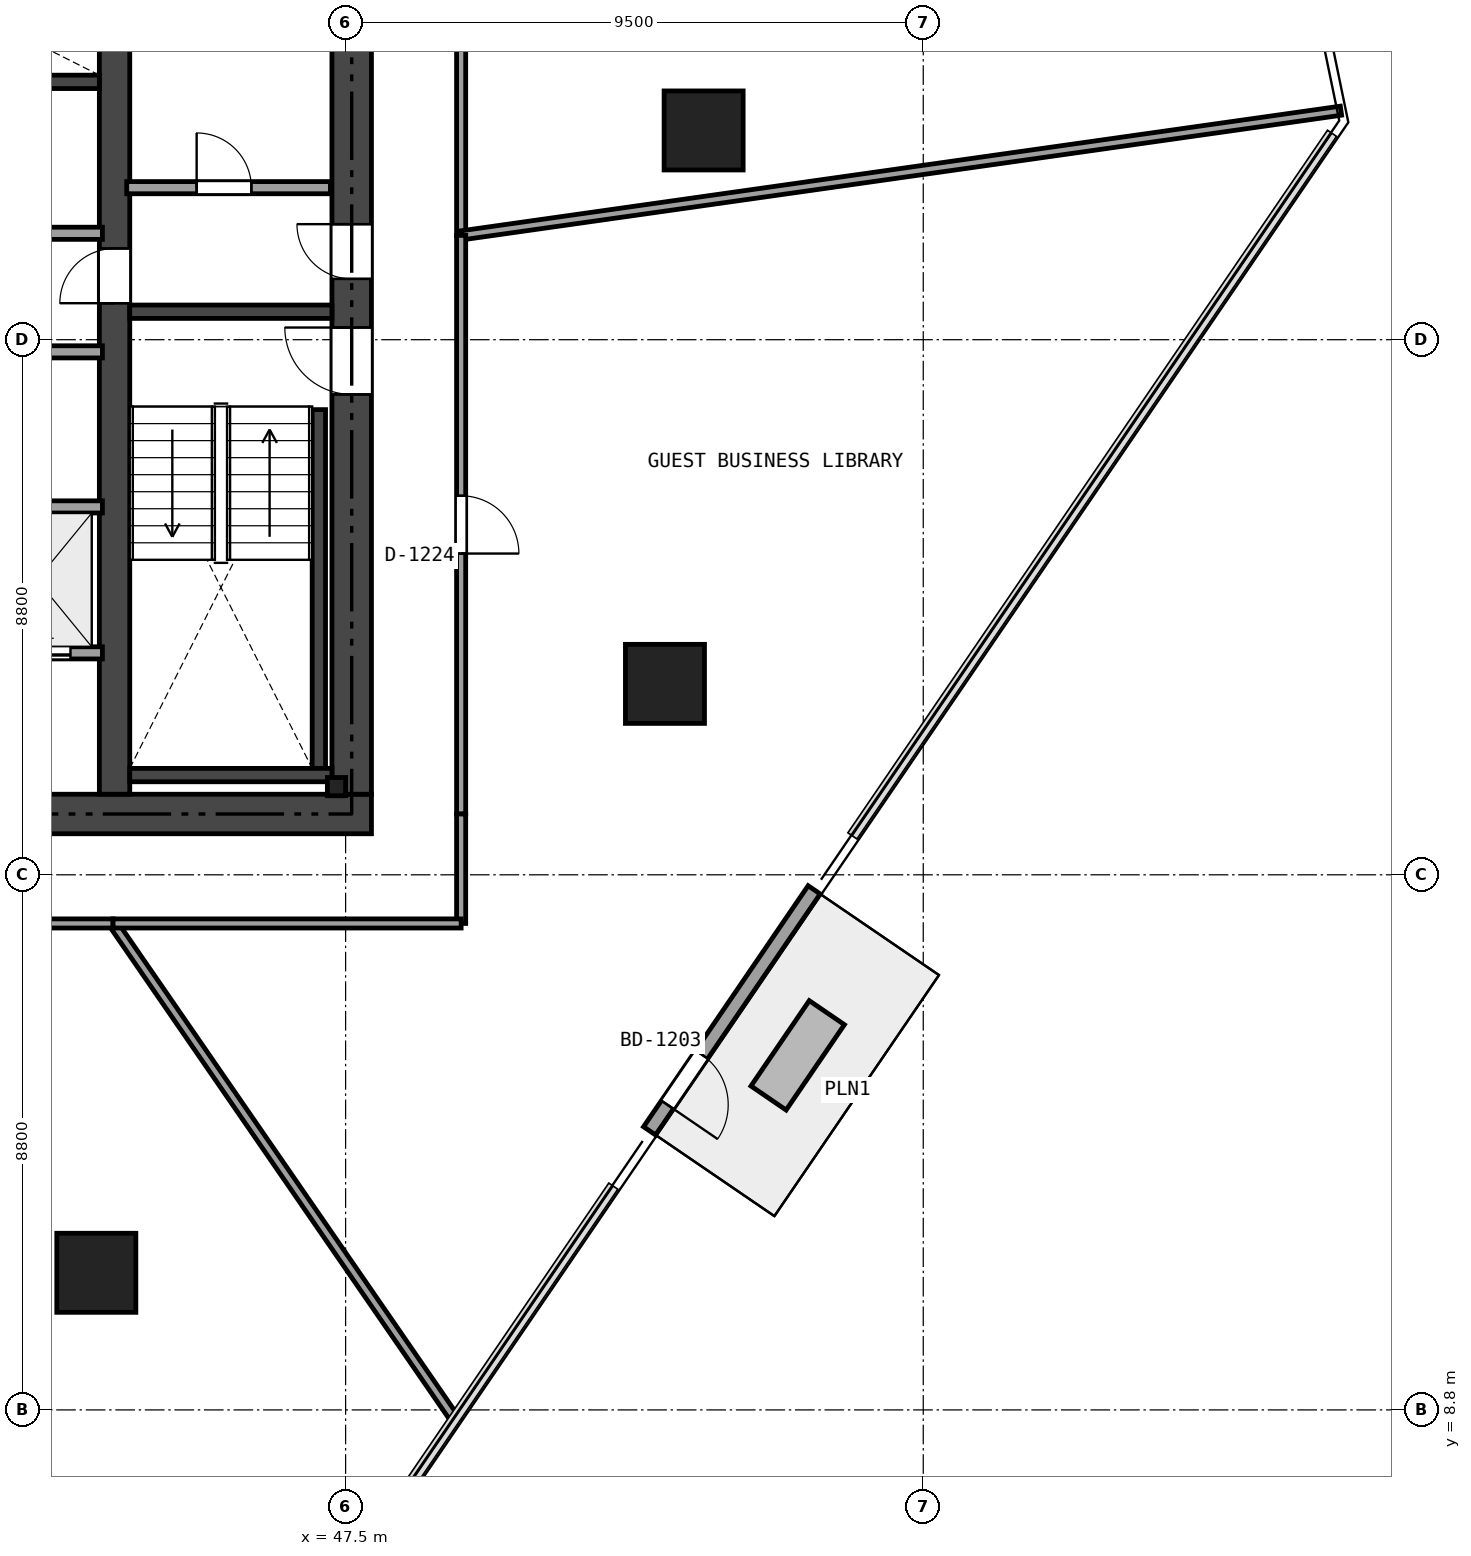
"""IFC4 building model, lengths in metres.
Left out: names, types, materials, properties, quantities, classifications, styles, units other than length and angle.
Written with IfcOpenShell. Run it as: python <this file> out.ifc"""

import sys

from ifc_helpers import new_model, si_unit, direction, frame, frame_2d, origin, origin_2d, place, context, subcontext, project, spatial, rectangle, i_section, extrude, element, fill, save


model = new_model("IFC4")
c1 = context("Model", 3, precision=1e-05, world=origin(), true_north=direction((0.0, 1.0)))
c2 = subcontext(c1, "Body", "Model", "MODEL_VIEW")
j1 = project(units=[si_unit("LENGTHUNIT", "METRE"), si_unit("PLANEANGLEUNIT", "RADIAN")], contexts=[c1])
p1 = place(None, origin())
s1 = spatial("IfcSite", under=j1, at=p1, CompositionType="ELEMENT")
p2 = place(p1, origin())
s2 = spatial("IfcBuilding", under=s1, at=p2, CompositionType="ELEMENT")
p3 = place(p2, frame((0.0, 0.0, 51.15)))
s3 = spatial("IfcBuildingStorey", under=s2, at=p3, CompositionType="ELEMENT", Elevation=51.15)
p4 = place(p3, frame((26.475, 18.6, 0.0), z_axis=(0.0, 0.0, 1.0), x_axis=(1.0, 0.0, 0.0)))
e1 = element("IfcWall", 1, at=p4, inside=s3, PredefinedType="SHEAR", context=c2, shape_type="SweptSolid", body=[
    extrude(rectangle(XDim=21.45, YDim=0.65, at=frame_2d((10.725, 0.0))), origin(), (0.0, 0.0, 1.0), 3.17),
])
p5 = place(p4, frame((12.45, 0.0, 0.0)))
e2 = element("IfcOpeningElement", 2, at=p5, cuts=e1, PredefinedType="OPENING", context=c2, shape_type="SweptSolid", body=[
    extrude(rectangle(XDim=1.15, YDim=2.15, at=frame_2d((0.575, 1.075))), frame((0.0, 0.335, 0.0), z_axis=(0.0, -1.0, 0.0), x_axis=(1.0, 0.0, 0.0)), (0.0, 0.0, 1.0), 0.67),
])
p6 = place(p4, frame((5.275, 0.0, 0.0)))
e3 = element("IfcOpeningElement", 3, at=p6, cuts=e1, PredefinedType="OPENING", context=c2, shape_type="SweptSolid", body=[
    extrude(rectangle(XDim=0.9, YDim=2.1, at=frame_2d((0.45, 1.05))), frame((0.0, 0.335, 0.0), z_axis=(0.0, -1.0, 0.0), x_axis=(1.0, 0.0, 0.0)), (0.0, 0.0, 1.0), 0.67),
])
p7 = place(p3, frame((47.6, 18.925, 0.0), z_axis=(0.0, 0.0, 1.0), x_axis=(0.0, 1.0, 0.0)))
e4 = element("IfcWall", 4, at=p7, inside=s3, PredefinedType="SHEAR", context=c2, shape_type="SweptSolid", body=[
    extrude(rectangle(XDim=14.95, YDim=0.65, at=frame_2d((7.475, 0.0))), origin(), (0.0, 0.0, 1.0), 3.17),
])
p8 = place(p7, frame((6.575, 0.0, 0.0)))
e5 = element("IfcOpeningElement", 5, at=p8, cuts=e4, PredefinedType="OPENING", context=c2, shape_type="SweptSolid", body=[
    extrude(rectangle(XDim=1.1, YDim=2.15, at=frame_2d((0.55, 1.075))), frame((0.0, 0.335, 0.0), z_axis=(0.0, -1.0, 0.0), x_axis=(1.0, 0.0, 0.0)), (0.0, 0.0, 1.0), 0.67),
])
p9 = place(p7, frame((8.475, 0.0, 0.0)))
e6 = element("IfcOpeningElement", 6, at=p9, cuts=e4, PredefinedType="OPENING", context=c2, shape_type="SweptSolid", body=[
    extrude(rectangle(XDim=0.9, YDim=2.1, at=frame_2d((0.45, 1.05))), frame((0.0, 0.335, 0.0), z_axis=(0.0, -1.0, 0.0), x_axis=(1.0, 0.0, 0.0)), (0.0, 0.0, 1.0), 0.67),
])
p10 = place(p7, frame((13.125, 0.0, 0.0)))
e7 = element("IfcOpeningElement", 7, at=p10, cuts=e4, PredefinedType="OPENING", context=c2, shape_type="SweptSolid", body=[
    extrude(rectangle(XDim=0.9, YDim=2.1, at=frame_2d((0.45, 1.05))), frame((0.0, 0.335, 0.0), z_axis=(0.0, -1.0, 0.0), x_axis=(1.0, 0.0, 0.0)), (0.0, 0.0, 1.0), 0.67),
])
p11 = place(p3, frame((43.7, 18.925, 0.0), z_axis=(0.0, 0.0, 1.0), x_axis=(0.0, 1.0, 0.0)))
e8 = element("IfcWall", 8, at=p11, inside=s3, PredefinedType="SHEAR", context=c2, shape_type="SweptSolid", body=[
    extrude(rectangle(XDim=14.95, YDim=0.5, at=frame_2d((7.475, 0.0))), origin(), (0.0, 0.0, 1.0), 3.17),
])
p12 = place(p11, frame((8.075, 0.0, 0.0)))
e9 = element("IfcOpeningElement", 9, at=p12, cuts=e8, PredefinedType="OPENING", context=c2, shape_type="SweptSolid", body=[
    extrude(rectangle(XDim=0.9, YDim=2.1, at=frame_2d((0.45, 1.05))), frame((0.0, 0.26, 0.0), z_axis=(0.0, -1.0, 0.0), x_axis=(1.0, 0.0, 0.0)), (0.0, 0.0, 1.0), 0.52),
])
p13 = place(p3, frame((43.95, 26.86, 0.0), z_axis=(0.0, 0.0, 1.0), x_axis=(1.0, 0.0, 0.0)))
e10 = element("IfcWall", 10, at=p13, inside=s3, PredefinedType="SHEAR", context=c2, shape_type="SweptSolid", body=[
    extrude(rectangle(XDim=3.325, YDim=0.22, at=frame_2d((1.663, 0.0))), origin(), (0.0, 0.0, 1.0), 3.17),
])
p14 = place(p3, frame((47.06, 19.35, 0.0), z_axis=(0.0, 0.0, 1.0), x_axis=(0.0, 1.0, 0.0)))
e11 = element("IfcWall", 11, at=p14, inside=s3, PredefinedType="SHEAR", context=c2, shape_type="SweptSolid", body=[
    extrude(rectangle(XDim=5.9, YDim=0.22, at=frame_2d((2.95, 0.0))), origin(), (0.0, 0.0, 1.0), 3.17),
])
p15 = place(p3, frame((43.95, 19.24, 0.0), z_axis=(0.0, 0.0, 1.0), x_axis=(1.0, 0.0, 0.0)))
e12 = element("IfcWall", 12, at=p15, inside=s3, PredefinedType="SHEAR", context=c2, shape_type="SweptSolid", body=[
    extrude(rectangle(XDim=3.325, YDim=0.22, at=frame_2d((1.663, 0.0))), origin(), (0.0, 0.0, 1.0), 3.17),
])
p16 = place(p3, frame((35.84, 30.64, 0.0), z_axis=(0.0, 0.0, 1.0), x_axis=(1.0, 0.0, 0.0)))
e13 = element("IfcWall", 13, at=p16, inside=s3, PredefinedType="SHEAR", context=c2, shape_type="SweptSolid", body=[
    extrude(rectangle(XDim=7.61, YDim=0.22, at=frame_2d((3.805, 0.0))), origin(), (0.0, 0.0, 1.0), 3.17),
])
for number, where, z_axis, x_axis in (
    (14, (53.388, 29.841, 0.0), (0.0, 0.0, 1.0), (1.0, 0.0, 0.0)),
    (15, (43.4, 11.055, 0.0), (0.0, 0.0, 1.0), (1.0, 0.0, 0.0)),
    (16, (52.752, 20.74, 0.0), (0.0, 0.0, 1.0), (1.0, 0.0, 0.0)),
):
    element("IfcColumn", number, at=place(p3, frame(where, z_axis=z_axis, x_axis=x_axis)), inside=s3, PredefinedType="COLUMN", context=c2, shape_type="SweptSolid", body=[
        extrude(rectangle(XDim=1.3, YDim=1.3, at=origin_2d()), origin(), (0.0, 0.0, 1.0), 3.17),
    ])
p17 = place(p3, frame((47.35, 19.05, 0.0), z_axis=(0.0, 0.0, 1.0), x_axis=(1.0, 0.0, 0.0)))
e17 = element("IfcColumn", 17, at=p17, inside=s3, PredefinedType="PILASTER", context=c2, shape_type="SweptSolid", body=[
    extrude(i_section(OverallWidth=0.3, OverallDepth=0.3, WebThickness=0.011, FlangeThickness=0.019, at=origin_2d()), origin(), (0.0, 0.0, 1.0), 3.17),
])
p18 = place(p3, frame((55.206, 17.353, 0.0), z_axis=(0.0, 0.0, 1.0), x_axis=(-0.563937959306, -0.825817157761, 0.0)))
e18 = element("IfcWall", 18, at=p18, inside=s3, PredefinedType="SOLIDWALL", context=c2, shape_type="SweptSolid", body=[
    extrude(rectangle(XDim=4.8, YDim=0.24, at=frame_2d((2.4, 0.0))), origin(), (0.0, 0.0, 1.0), 3.17),
])
p19 = place(p18, frame((3.28, 0.0, 0.0)))
e19 = element("IfcOpeningElement", 19, at=p19, cuts=e18, PredefinedType="OPENING", context=c2, shape_type="SweptSolid", body=[
    extrude(rectangle(XDim=1.0, YDim=2.15, at=frame_2d((0.5, 1.075))), frame((0.0, 0.13, 0.0), z_axis=(0.0, -1.0, 0.0), x_axis=(1.0, 0.0, 0.0)), (0.0, 0.0, 1.0), 0.26),
])
p20 = place(p3, frame((43.9, 28.9, 0.0), z_axis=(0.0, 0.0, 1.0), x_axis=(1.0, 0.0, 0.0)))
e20 = element("IfcWall", 20, at=p20, inside=s3, PredefinedType="SOLIDWALL", context=c2, shape_type="SweptSolid", body=[
    extrude(rectangle(XDim=3.35, YDim=0.2, at=frame_2d((1.675, 0.0))), origin(), (0.0, 0.0, 1.0), 3.17),
])
p21 = place(p20, frame((1.15, 0.0, 0.0)))
e21 = element("IfcOpeningElement", 21, at=p21, cuts=e20, PredefinedType="OPENING", context=c2, shape_type="SweptSolid", body=[
    extrude(rectangle(XDim=0.9, YDim=2.1, at=frame_2d((0.45, 1.05))), frame((0.0, 0.11, 0.0), z_axis=(0.0, -1.0, 0.0), x_axis=(1.0, 0.0, 0.0)), (0.0, 0.0, 1.0), 0.22),
])
for number, where, z_axis, x_axis in (
    (22, (35.62, 28.15, 0.0), (0.0, 0.0, 1.0), (1.0, 0.0, 0.0)),
    (23, (35.62, 26.2, 0.0), (0.0, 0.0, 1.0), (1.0, 0.0, 0.0)),
):
    element("IfcWall", number, at=place(p3, frame(where, z_axis=z_axis, x_axis=x_axis)), inside=s3, PredefinedType="SOLIDWALL", context=c2, shape_type="SweptSolid", body=[
        extrude(rectangle(XDim=7.88, YDim=0.2, at=frame_2d((3.94, 0.0))), origin(), (0.0, 0.0, 1.0), 3.17),
    ])
p22 = place(p3, frame((35.62, 23.65, 0.0), z_axis=(0.0, 0.0, 1.0), x_axis=(1.0, 0.0, 0.0)))
e24 = element("IfcWall", 24, at=p22, inside=s3, PredefinedType="SOLIDWALL", context=c2, shape_type="SweptSolid", body=[
    extrude(rectangle(XDim=7.88, YDim=0.2, at=frame_2d((3.94, 0.0))), origin(), (0.0, 0.0, 1.0), 2.691),
])
p23 = place(p3, frame((35.62, 21.25, 0.0), z_axis=(0.0, 0.0, 1.0), x_axis=(1.0, 0.0, 0.0)))
e25 = element("IfcWall", 25, at=p23, inside=s3, PredefinedType="SOLIDWALL", context=c2, shape_type="SweptSolid", body=[
    extrude(rectangle(XDim=7.88, YDim=0.2, at=frame_2d((3.94, 0.0))), origin(), (0.0, 0.0, 1.0), 3.17),
])
p24 = place(p23, frame((0.405, 0.0, 0.0)))
e26 = element("IfcOpeningElement", 26, at=p24, cuts=e25, PredefinedType="OPENING", context=c2, shape_type="SweptSolid", body=[
    extrude(rectangle(XDim=1.1, YDim=2.15, at=frame_2d((0.55, 1.075))), frame((0.0, 0.11, 0.0), z_axis=(0.0, -1.0, 0.0), x_axis=(1.0, 0.0, 0.0)), (0.0, 0.0, 1.0), 0.22),
])
p25 = place(p23, frame((2.355, 0.0, 0.0)))
e27 = element("IfcOpeningElement", 27, at=p25, cuts=e25, PredefinedType="OPENING", context=c2, shape_type="SweptSolid", body=[
    extrude(rectangle(XDim=1.1, YDim=2.15, at=frame_2d((0.55, 1.075))), frame((0.0, 0.11, 0.0), z_axis=(0.0, -1.0, 0.0), x_axis=(1.0, 0.0, 0.0)), (0.0, 0.0, 1.0), 0.22),
])
p26 = place(p23, frame((4.305, 0.0, 0.0)))
e28 = element("IfcOpeningElement", 28, at=p26, cuts=e25, PredefinedType="OPENING", context=c2, shape_type="SweptSolid", body=[
    extrude(rectangle(XDim=1.1, YDim=2.15, at=frame_2d((0.55, 1.075))), frame((0.0, 0.11, 0.0), z_axis=(0.0, -1.0, 0.0), x_axis=(1.0, 0.0, 0.0)), (0.0, 0.0, 1.0), 0.22),
])
p27 = place(p23, frame((6.255, 0.0, 0.0)))
e29 = element("IfcOpeningElement", 29, at=p27, cuts=e25, PredefinedType="OPENING", context=c2, shape_type="SweptSolid", body=[
    extrude(rectangle(XDim=1.1, YDim=2.15, at=frame_2d((0.55, 1.075))), frame((0.0, 0.11, 0.0), z_axis=(0.0, -1.0, 0.0), x_axis=(1.0, 0.0, 0.0)), (0.0, 0.0, 1.0), 0.22),
])
p28 = place(p3, frame((49.4, 34.2, 0.0), z_axis=(0.0, 0.0, 1.0), x_axis=(0.0, -1.0, 0.0)))
e30 = element("IfcWall", 30, at=p28, inside=s3, PredefinedType="PARTITIONING", context=c2, shape_type="SweptSolid", body=[
    extrude(rectangle(XDim=6.085, YDim=0.15, at=frame_2d((3.042, 0.0))), origin(), (0.0, 0.0, 1.0), 2.395),
])
p29 = place(p3, frame((49.4, 28.115, 0.0), z_axis=(0.0, 0.0, 1.0), x_axis=(0.990103589489, 0.140338455463, 0.0)))
e31 = element("IfcWall", 31, at=p29, inside=s3, PredefinedType="PARTITIONING", context=c2, shape_type="SweptSolid", body=[
    extrude(rectangle(XDim=14.615, YDim=0.15, at=frame_2d((7.307, 0.0))), origin(), (0.0, 0.0, 1.0), 2.355),
])
p30 = place(p3, frame((49.32, 8.615, 0.0), z_axis=(0.0, 0.0, 1.0), x_axis=(-0.567743283975, 0.823205662943, 0.0)))
e32 = element("IfcWall", 32, at=p30, inside=s3, PredefinedType="PARTITIONING", context=c2, shape_type="SweptSolid", body=[
    extrude(rectangle(XDim=9.943, YDim=0.15, at=frame_2d((4.971, 0.0))), origin(), (0.0, 0.0, 1.0), 2.355),
])
p31 = place(p3, frame((43.675, 16.8, 0.0), z_axis=(0.0, 0.0, 1.0), x_axis=(-1.0, 0.0, 0.0)))
e33 = element("IfcWall", 33, at=p31, inside=s3, PredefinedType="PARTITIONING", context=c2, shape_type="SweptSolid", body=[
    extrude(rectangle(XDim=9.594, YDim=0.15, at=frame_2d((4.797, 0.0))), origin(), (0.0, 0.0, 1.0), 2.395),
])
p32 = place(p31, frame((4.322, 0.0, 0.0)))
e34 = element("IfcOpeningElement", 34, at=p32, cuts=e33, PredefinedType="OPENING", context=c2, shape_type="SweptSolid", body=[
    extrude(rectangle(XDim=0.95, YDim=2.15, at=frame_2d((0.475, 1.075))), frame((0.0, 0.085, 0.0), z_axis=(0.0, -1.0, 0.0), x_axis=(1.0, 0.0, 0.0)), (0.0, 0.0, 1.0), 0.17),
])
p33 = place(p3, frame((49.4, 28.115, 0.0), z_axis=(0.0, 0.0, 1.0), x_axis=(0.0, -1.0, 0.0)))
e35 = element("IfcWall", 35, at=p33, inside=s3, PredefinedType="PARTITIONING", context=c2, shape_type="SweptSolid", body=[
    extrude(rectangle(XDim=9.515, YDim=0.15, at=frame_2d((4.757, 0.0))), origin(), (0.0, 0.0, 1.0), 2.395),
])
p34 = place(p33, frame((4.282, 0.0, 0.0)))
e36 = element("IfcOpeningElement", 36, at=p34, cuts=e35, PredefinedType="OPENING", context=c2, shape_type="SweptSolid", body=[
    extrude(rectangle(XDim=0.95, YDim=2.15, at=frame_2d((0.475, 1.075))), frame((0.0, 0.085, 0.0), z_axis=(0.0, -1.0, 0.0), x_axis=(1.0, 0.0, 0.0)), (0.0, 0.0, 1.0), 0.17),
])
p35 = place(p3, frame((49.4, 18.6, 0.0), z_axis=(0.0, 0.0, 1.0), x_axis=(0.0, -1.0, 0.0)))
e37 = element("IfcWall", 37, at=p35, inside=s3, PredefinedType="PARTITIONING", context=c2, shape_type="SweptSolid", body=[
    extrude(rectangle(XDim=1.8, YDim=0.15, at=frame_2d((0.9, 0.0))), origin(), (0.0, 0.0, 1.0), 2.355),
])
p36 = place(p3, frame((49.4, 16.8, 0.0), z_axis=(0.0, 0.0, 1.0), x_axis=(-1.0, 0.0, 0.0)))
e38 = element("IfcWall", 38, at=p36, inside=s3, PredefinedType="PARTITIONING", context=c2, shape_type="SweptSolid", body=[
    extrude(rectangle(XDim=5.725, YDim=0.15, at=frame_2d((2.862, 0.0))), origin(), (0.0, 0.0, 1.0), 2.355),
])
p37 = place(p19, origin())
e39 = element("IfcDoor", 39, at=p37, inside=s3, OperationType="SINGLE_SWING_RIGHT", PredefinedType="DOOR", context=c2, shape_type="SweptSolid", body=[
    extrude(rectangle(XDim=1.0, YDim=2.15, at=frame_2d((0.5, 1.075))), frame((0.0, 0.025, 0.0), z_axis=(0.0, -1.0, 0.0), x_axis=(1.0, 0.0, 0.0)), (0.0, 0.0, 1.0), 0.05),
])
fill(e19, e39)
p38 = place(p8, origin())
e40 = element("IfcDoor", 40, at=p38, inside=s3, OperationType="SINGLE_SWING_RIGHT", PredefinedType="DOOR", context=c2, shape_type="SweptSolid", body=[
    extrude(rectangle(XDim=1.1, YDim=2.15, at=frame_2d((0.55, 1.075))), frame((0.0, 0.025, 0.0), z_axis=(0.0, -1.0, 0.0), x_axis=(1.0, 0.0, 0.0)), (0.0, 0.0, 1.0), 0.05),
])
fill(e5, e40)
p39 = place(p12, origin())
e41 = element("IfcDoor", 41, at=p39, inside=s3, OperationType="SINGLE_SWING_LEFT", PredefinedType="DOOR", context=c2, shape_type="SweptSolid", body=[
    extrude(rectangle(XDim=0.9, YDim=2.1, at=frame_2d((0.45, 1.05))), frame((0.0, 0.025, 0.0), z_axis=(0.0, -1.0, 0.0), x_axis=(1.0, 0.0, 0.0)), (0.0, 0.0, 1.0), 0.05),
])
fill(e9, e41)
p40 = place(p9, origin())
e42 = element("IfcDoor", 42, at=p40, inside=s3, OperationType="SINGLE_SWING_RIGHT", PredefinedType="DOOR", context=c2, shape_type="SweptSolid", body=[
    extrude(rectangle(XDim=0.9, YDim=2.1, at=frame_2d((0.45, 1.05))), frame((0.0, 0.025, 0.0), z_axis=(0.0, -1.0, 0.0), x_axis=(1.0, 0.0, 0.0)), (0.0, 0.0, 1.0), 0.05),
])
fill(e6, e42)
p41 = place(p21, origin())
e43 = element("IfcDoor", 43, at=p41, inside=s3, OperationType="SINGLE_SWING_LEFT", PredefinedType="DOOR", context=c2, shape_type="SweptSolid", body=[
    extrude(rectangle(XDim=0.9, YDim=2.1, at=frame_2d((0.45, 1.05))), frame((0.0, 0.025, 0.0), z_axis=(0.0, -1.0, 0.0), x_axis=(1.0, 0.0, 0.0)), (0.0, 0.0, 1.0), 0.05),
])
fill(e21, e43)
p42 = place(p27, origin())
e44 = element("IfcDoor", 44, at=p42, inside=s3, OperationType="SLIDING_TO_LEFT", PredefinedType="DOOR", context=c2, shape_type="SweptSolid", body=[
    extrude(rectangle(XDim=1.1, YDim=2.15, at=frame_2d((0.55, 1.075))), frame((0.0, 0.025, 0.0), z_axis=(0.0, -1.0, 0.0), x_axis=(1.0, 0.0, 0.0)), (0.0, 0.0, 1.0), 0.05),
])
fill(e29, e44)
p43 = place(p34, origin())
e45 = element("IfcDoor", 45, at=p43, inside=s3, OperationType="SINGLE_SWING_RIGHT", PredefinedType="DOOR", context=c2, shape_type="SweptSolid", body=[
    extrude(rectangle(XDim=0.95, YDim=2.15, at=frame_2d((0.475, 1.075))), frame((0.0, 0.025, 0.0), z_axis=(0.0, -1.0, 0.0), x_axis=(1.0, 0.0, 0.0)), (0.0, 0.0, 1.0), 0.05),
])
fill(e36, e45)
save(model, sys.argv[1])
